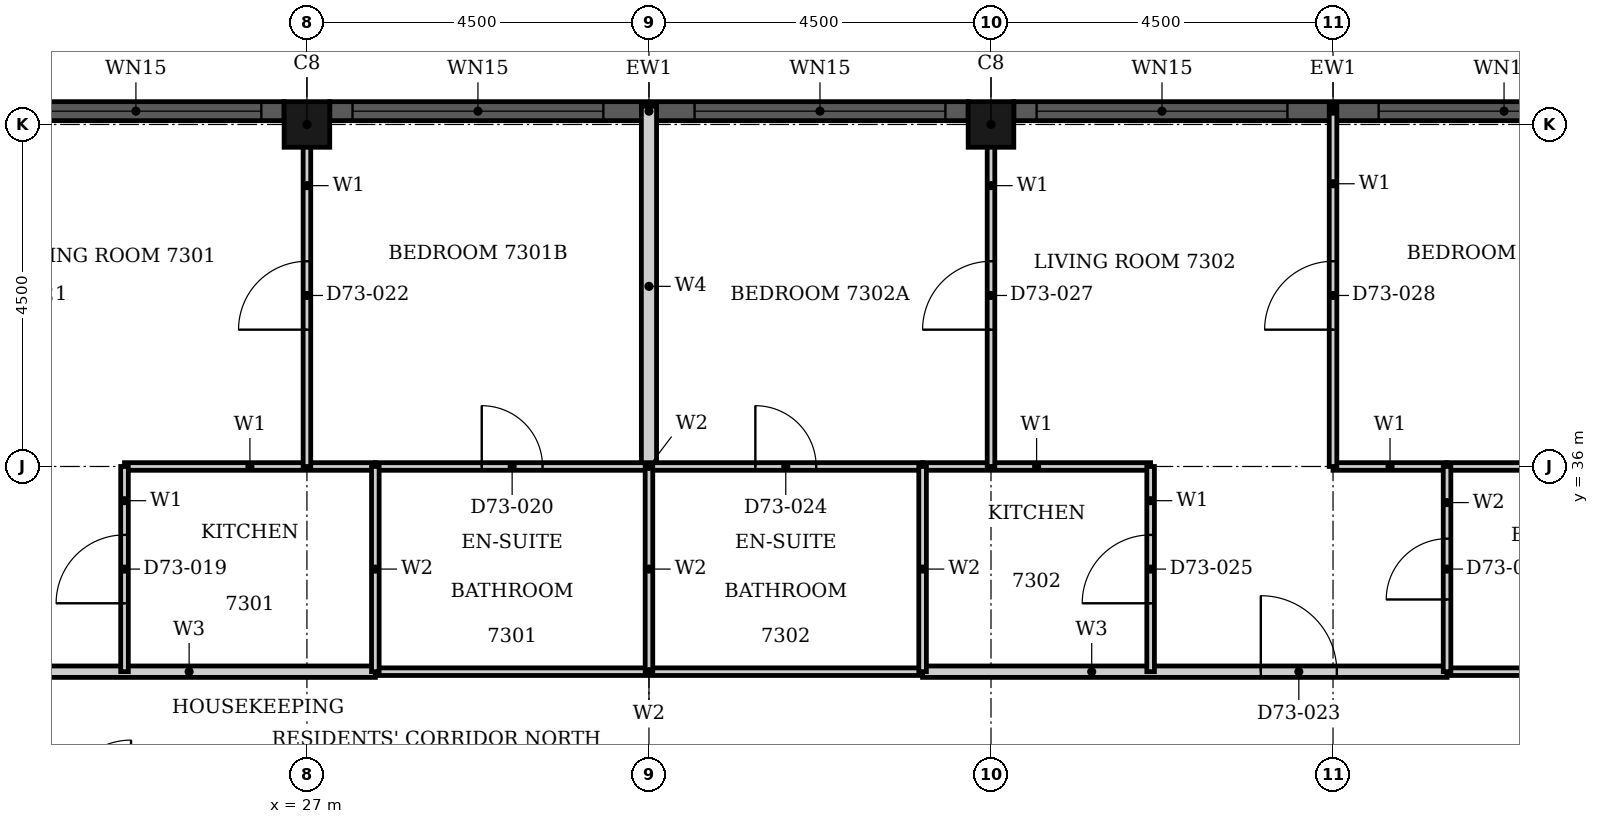
"""IFC4 building model, lengths in metres.
Left out: names, types, materials, properties, quantities, classifications, styles, units other than length and angle.
Written with IfcOpenShell. Run it as: python <this file> out.ifc"""

import sys

from ifc_helpers import new_model, si_unit, direction, frame, frame_2d, origin, origin_2d, place, context, subcontext, project, spatial, rectangle, hollow_rectangle, extrude, element, fill, save


model = new_model("IFC4")
c1 = context("Model", 3, precision=1e-05, world=origin(), true_north=direction((0.0, 1.0)))
c2 = subcontext(c1, "Body", "Model", "MODEL_VIEW")
j1 = project(units=[si_unit("LENGTHUNIT", "METRE"), si_unit("PLANEANGLEUNIT", "RADIAN")], contexts=[c1])
p1 = place(None, origin())
s1 = spatial("IfcSite", under=j1, at=p1, CompositionType="ELEMENT")
p2 = place(p1, origin())
s2 = spatial("IfcBuilding", under=s1, at=p2, CompositionType="ELEMENT")
p3 = place(p2, frame((0.0, 0.0, 287.1)))
s3 = spatial("IfcBuildingStorey", under=s2, at=p3, CompositionType="ELEMENT", Elevation=287.1)
for number, where, z_axis, x_axis in (
    (1, (36.0, 40.5, 0.0), (0.0, 0.0, 1.0), (1.0, 0.0, 0.0)),
    (2, (27.0, 40.5, 0.0), (0.0, 0.0, 1.0), (1.0, 0.0, 0.0)),
):
    element("IfcColumn", number, at=place(p3, frame(where, z_axis=z_axis, x_axis=x_axis)), inside=s3, PredefinedType="COLUMN", context=c2, shape_type="SweptSolid", body=[
        extrude(hollow_rectangle(XDim=0.6, YDim=0.6, WallThickness=0.02, at=origin_2d()), origin(), (0.0, 0.0, 1.0), 3.7),
    ])
p4 = place(p3, frame((44.7, 40.675, 0.0), z_axis=(0.0, 0.0, 1.0), x_axis=(-1.0, 0.0, 0.0)))
e3 = element("IfcWall", 3, at=p4, inside=s3, PredefinedType="SOLIDWALL", context=c2, shape_type="SweptSolid", body=[
    extrude(rectangle(XDim=8.4, YDim=0.25, at=frame_2d((4.2, 0.0))), origin(), (0.0, 0.0, 1.0), 3.7),
])
p5 = place(p4, frame((0.3, 0.0, 0.45)))
e4 = element("IfcOpeningElement", 4, at=p5, cuts=e3, PredefinedType="OPENING", context=c2, shape_type="SweptSolid", body=[
    extrude(rectangle(XDim=3.3, YDim=2.3, at=frame_2d((1.65, 1.15))), frame((0.0, 0.135, 0.0), z_axis=(0.0, -1.0, 0.0), x_axis=(1.0, 0.0, 0.0)), (0.0, 0.0, 1.0), 0.27),
])
p6 = place(p4, frame((4.8, 0.0, 0.45)))
e5 = element("IfcOpeningElement", 5, at=p6, cuts=e3, PredefinedType="OPENING", context=c2, shape_type="SweptSolid", body=[
    extrude(rectangle(XDim=3.3, YDim=2.3, at=frame_2d((1.65, 1.15))), frame((0.0, 0.135, 0.0), z_axis=(0.0, -1.0, 0.0), x_axis=(1.0, 0.0, 0.0)), (0.0, 0.0, 1.0), 0.27),
])
p7 = place(p3, frame((35.7, 40.675, 0.0), z_axis=(0.0, 0.0, 1.0), x_axis=(-1.0, 0.0, 0.0)))
e6 = element("IfcWall", 6, at=p7, inside=s3, PredefinedType="SOLIDWALL", context=c2, shape_type="SweptSolid", body=[
    extrude(rectangle(XDim=8.4, YDim=0.25, at=frame_2d((4.2, 0.0))), origin(), (0.0, 0.0, 1.0), 3.7),
])
p8 = place(p7, frame((0.3, 0.0, 0.45)))
e7 = element("IfcOpeningElement", 7, at=p8, cuts=e6, PredefinedType="OPENING", context=c2, shape_type="SweptSolid", body=[
    extrude(rectangle(XDim=3.3, YDim=2.3, at=frame_2d((1.65, 1.15))), frame((0.0, 0.135, 0.0), z_axis=(0.0, -1.0, 0.0), x_axis=(1.0, 0.0, 0.0)), (0.0, 0.0, 1.0), 0.27),
])
p9 = place(p7, frame((4.8, 0.0, 0.45)))
e8 = element("IfcOpeningElement", 8, at=p9, cuts=e6, PredefinedType="OPENING", context=c2, shape_type="SweptSolid", body=[
    extrude(rectangle(XDim=3.3, YDim=2.3, at=frame_2d((1.65, 1.15))), frame((0.0, 0.135, 0.0), z_axis=(0.0, -1.0, 0.0), x_axis=(1.0, 0.0, 0.0)), (0.0, 0.0, 1.0), 0.27),
])
p10 = place(p3, frame((26.7, 40.675, 0.0), z_axis=(0.0, 0.0, 1.0), x_axis=(-1.0, 0.0, 0.0)))
e9 = element("IfcWall", 9, at=p10, inside=s3, PredefinedType="SOLIDWALL", context=c2, shape_type="SweptSolid", body=[
    extrude(rectangle(XDim=8.4, YDim=0.25, at=frame_2d((4.2, 0.0))), origin(), (0.0, 0.0, 1.0), 3.7),
])
p11 = place(p10, frame((0.3, 0.0, 0.45)))
e10 = element("IfcOpeningElement", 10, at=p11, cuts=e9, PredefinedType="OPENING", context=c2, shape_type="SweptSolid", body=[
    extrude(rectangle(XDim=3.3, YDim=2.3, at=frame_2d((1.65, 1.15))), frame((0.0, 0.135, 0.0), z_axis=(0.0, -1.0, 0.0), x_axis=(1.0, 0.0, 0.0)), (0.0, 0.0, 1.0), 0.27),
])
p12 = place(p10, frame((4.8, 0.0, 0.45)))
e11 = element("IfcOpeningElement", 11, at=p12, cuts=e9, PredefinedType="OPENING", context=c2, shape_type="SweptSolid", body=[
    extrude(rectangle(XDim=3.3, YDim=2.3, at=frame_2d((1.65, 1.15))), frame((0.0, 0.135, 0.0), z_axis=(0.0, -1.0, 0.0), x_axis=(1.0, 0.0, 0.0)), (0.0, 0.0, 1.0), 0.27),
])
p13 = place(p3, frame((20.4, 33.3, 0.0), z_axis=(0.0, 0.0, 1.0), x_axis=(1.0, 0.0, 0.0)))
e12 = element("IfcWall", 12, at=p13, inside=s3, PredefinedType="PARTITIONING", context=c2, shape_type="SweptSolid", body=[
    extrude(rectangle(XDim=7.5, YDim=0.15, at=frame_2d((3.75, 0.0))), origin(), (0.0, 0.0, 1.0), 3.4),
])
p14 = place(p13, frame((1.6, 0.0, 0.0)))
e13 = element("IfcOpeningElement", 13, at=p14, cuts=e12, PredefinedType="OPENING", context=c2, shape_type="SweptSolid", body=[
    extrude(rectangle(XDim=1.0, YDim=2.2, at=frame_2d((0.5, 1.1))), frame((0.0, 0.085, 0.0), z_axis=(0.0, -1.0, 0.0), x_axis=(1.0, 0.0, 0.0)), (0.0, 0.0, 1.0), 0.17),
])
p15 = place(p3, frame((35.1, 33.3, 0.0), z_axis=(0.0, 0.0, 1.0), x_axis=(1.0, 0.0, 0.0)))
e14 = element("IfcWall", 14, at=p15, inside=s3, PredefinedType="PARTITIONING", context=c2, shape_type="SweptSolid", body=[
    extrude(rectangle(XDim=6.9, YDim=0.15, at=frame_2d((3.45, 0.0))), origin(), (0.0, 0.0, 1.0), 3.4),
])
p16 = place(p15, frame((4.45, 0.0, 0.0)))
e15 = element("IfcOpeningElement", 15, at=p16, cuts=e14, PredefinedType="OPENING", context=c2, shape_type="SweptSolid", body=[
    extrude(rectangle(XDim=1.0, YDim=2.2, at=frame_2d((0.5, 1.1))), frame((0.0, 0.085, 0.0), z_axis=(0.0, -1.0, 0.0), x_axis=(1.0, 0.0, 0.0)), (0.0, 0.0, 1.0), 0.17),
])
p17 = place(p3, frame((24.6, 36.0, 0.0), z_axis=(0.0, 0.0, 1.0), x_axis=(1.0, 0.0, 0.0)))
e16 = element("IfcWall", 16, at=p17, inside=s3, PredefinedType="PARTITIONING", context=c2, shape_type="SweptSolid", body=[
    extrude(rectangle(XDim=3.3, YDim=0.1, at=frame_2d((1.65, 0.0))), origin(), (0.0, 0.0, 1.0), 3.4),
])
p18 = place(p3, frame((40.5, 36.0, 0.0), z_axis=(0.0, 0.0, 1.0), x_axis=(1.0, 0.0, 0.0)))
e17 = element("IfcWall", 17, at=p18, inside=s3, PredefinedType="PARTITIONING", context=c2, shape_type="SweptSolid", body=[
    extrude(rectangle(XDim=1.5, YDim=0.1, at=frame_2d((0.75, 0.0))), origin(), (0.0, 0.0, 1.0), 3.4),
])
p19 = place(p3, frame((35.1, 36.0, 0.0), z_axis=(0.0, 0.0, 1.0), x_axis=(1.0, 0.0, 0.0)))
e18 = element("IfcWall", 18, at=p19, inside=s3, PredefinedType="PARTITIONING", context=c2, shape_type="SweptSolid", body=[
    extrude(rectangle(XDim=3.0, YDim=0.1, at=frame_2d((1.5, 0.0))), origin(), (0.0, 0.0, 1.0), 3.4),
])
p20 = place(p3, frame((24.6, 33.3, 0.0), z_axis=(0.0, 0.0, 1.0), x_axis=(0.0, 1.0, 0.0)))
e19 = element("IfcWall", 19, at=p20, inside=s3, PredefinedType="PARTITIONING", context=c2, shape_type="SweptSolid", body=[
    extrude(rectangle(XDim=2.7, YDim=0.1, at=frame_2d((1.35, 0.0))), origin(), (0.0, 0.0, 1.0), 3.4),
])
p21 = place(p20, frame((0.9, 0.0, 0.0)))
e20 = element("IfcOpeningElement", 20, at=p21, cuts=e19, PredefinedType="OPENING", context=c2, shape_type="SweptSolid", body=[
    extrude(rectangle(XDim=0.9, YDim=2.1, at=frame_2d((0.45, 1.05))), frame((0.0, 0.06, 0.0), z_axis=(0.0, -1.0, 0.0), x_axis=(1.0, 0.0, 0.0)), (0.0, 0.0, 1.0), 0.12),
])
p22 = place(p3, frame((27.0, 36.0, 0.0), z_axis=(0.0, 0.0, 1.0), x_axis=(0.0, 1.0, 0.0)))
e21 = element("IfcWall", 21, at=p22, inside=s3, PredefinedType="PARTITIONING", context=c2, shape_type="SweptSolid", body=[
    extrude(rectangle(XDim=4.69, YDim=0.1, at=frame_2d((2.345, 0.0))), origin(), (0.0, 0.0, 1.0), 3.4),
])
p23 = place(p22, frame((1.8, 0.0, 0.0)))
e22 = element("IfcOpeningElement", 22, at=p23, cuts=e21, PredefinedType="OPENING", context=c2, shape_type="SweptSolid", body=[
    extrude(rectangle(XDim=0.9, YDim=2.1, at=frame_2d((0.45, 1.05))), frame((0.0, 0.06, 0.0), z_axis=(0.0, -1.0, 0.0), x_axis=(1.0, 0.0, 0.0)), (0.0, 0.0, 1.0), 0.12),
])
p24 = place(p3, frame((36.0, 36.0, 0.0), z_axis=(0.0, 0.0, 1.0), x_axis=(0.0, 1.0, 0.0)))
e23 = element("IfcWall", 23, at=p24, inside=s3, PredefinedType="PARTITIONING", context=c2, shape_type="SweptSolid", body=[
    extrude(rectangle(XDim=4.69, YDim=0.1, at=frame_2d((2.345, 0.0))), origin(), (0.0, 0.0, 1.0), 3.4),
])
p25 = place(p24, frame((1.8, 0.0, 0.0)))
e24 = element("IfcOpeningElement", 24, at=p25, cuts=e23, PredefinedType="OPENING", context=c2, shape_type="SweptSolid", body=[
    extrude(rectangle(XDim=0.9, YDim=2.1, at=frame_2d((0.45, 1.05))), frame((0.0, 0.06, 0.0), z_axis=(0.0, -1.0, 0.0), x_axis=(1.0, 0.0, 0.0)), (0.0, 0.0, 1.0), 0.12),
])
p26 = place(p3, frame((38.1, 33.3, 0.0), z_axis=(0.0, 0.0, 1.0), x_axis=(0.0, 1.0, 0.0)))
e25 = element("IfcWall", 25, at=p26, inside=s3, PredefinedType="PARTITIONING", context=c2, shape_type="SweptSolid", body=[
    extrude(rectangle(XDim=2.7, YDim=0.1, at=frame_2d((1.35, 0.0))), origin(), (0.0, 0.0, 1.0), 3.4),
])
p27 = place(p26, frame((0.9, 0.0, 0.0)))
e26 = element("IfcOpeningElement", 26, at=p27, cuts=e25, PredefinedType="OPENING", context=c2, shape_type="SweptSolid", body=[
    extrude(rectangle(XDim=0.9, YDim=2.1, at=frame_2d((0.45, 1.05))), frame((0.0, 0.06, 0.0), z_axis=(0.0, -1.0, 0.0), x_axis=(1.0, 0.0, 0.0)), (0.0, 0.0, 1.0), 0.12),
])
p28 = place(p3, frame((40.5, 36.0, 0.0), z_axis=(0.0, 0.0, 1.0), x_axis=(0.0, 1.0, 0.0)))
e27 = element("IfcWall", 27, at=p28, inside=s3, PredefinedType="PARTITIONING", context=c2, shape_type="SweptSolid", body=[
    extrude(rectangle(XDim=4.74, YDim=0.1, at=frame_2d((2.37, 0.0))), origin(), (0.0, 0.0, 1.0), 3.4),
])
p29 = place(p28, frame((1.8, 0.0, 0.0)))
e28 = element("IfcOpeningElement", 28, at=p29, cuts=e27, PredefinedType="OPENING", context=c2, shape_type="SweptSolid", body=[
    extrude(rectangle(XDim=0.9, YDim=2.1, at=frame_2d((0.45, 1.05))), frame((0.0, 0.06, 0.0), z_axis=(0.0, -1.0, 0.0), x_axis=(1.0, 0.0, 0.0)), (0.0, 0.0, 1.0), 0.12),
])
p30 = place(p3, frame((31.5, 36.0, 0.0), z_axis=(0.0, 0.0, 1.0), x_axis=(0.0, 1.0, 0.0)))
e29 = element("IfcWall", 29, at=p30, inside=s3, PredefinedType="PARTITIONING", context=c2, shape_type="SweptSolid", body=[
    extrude(rectangle(XDim=4.74, YDim=0.2, at=frame_2d((2.37, 0.0))), origin(), (0.0, 0.0, 1.0), 3.4),
])
p31 = place(p3, frame((27.9, 33.3, 0.0), z_axis=(0.0, 0.0, 1.0), x_axis=(1.0, 0.0, 0.0)))
e30 = element("IfcWall", 30, at=p31, inside=s3, PredefinedType="PARTITIONING", context=c2, shape_type="SweptSolid", body=[
    extrude(rectangle(XDim=7.2, YDim=0.1, at=frame_2d((3.6, 0.0))), origin(), (0.0, 0.0, 1.0), 3.4),
])
p32 = place(p3, frame((42.0, 33.3, 0.0), z_axis=(0.0, 0.0, 1.0), x_axis=(1.0, 0.0, 0.0)))
e31 = element("IfcWall", 31, at=p32, inside=s3, PredefinedType="PARTITIONING", context=c2, shape_type="SweptSolid", body=[
    extrude(rectangle(XDim=3.0, YDim=0.1, at=frame_2d((1.5, 0.0))), origin(), (0.0, 0.0, 1.0), 3.4),
])
p33 = place(p3, frame((27.9, 36.0, 0.0), z_axis=(0.0, 0.0, 1.0), x_axis=(1.0, 0.0, 0.0)))
e32 = element("IfcWall", 32, at=p33, inside=s3, PredefinedType="PARTITIONING", context=c2, shape_type="SweptSolid", body=[
    extrude(rectangle(XDim=7.2, YDim=0.1, at=frame_2d((3.6, 0.0))), origin(), (0.0, 0.0, 1.0), 3.4),
])
p34 = place(p33, frame((1.4, 0.0, 0.0)))
e33 = element("IfcOpeningElement", 33, at=p34, cuts=e32, PredefinedType="OPENING", context=c2, shape_type="SweptSolid", body=[
    extrude(rectangle(XDim=0.8, YDim=2.1, at=frame_2d((0.4, 1.05))), frame((0.0, 0.06, 0.0), z_axis=(0.0, -1.0, 0.0), x_axis=(1.0, 0.0, 0.0)), (0.0, 0.0, 1.0), 0.12),
])
p35 = place(p33, frame((5.0, 0.0, 0.0)))
e34 = element("IfcOpeningElement", 34, at=p35, cuts=e32, PredefinedType="OPENING", context=c2, shape_type="SweptSolid", body=[
    extrude(rectangle(XDim=0.8, YDim=2.1, at=frame_2d((0.4, 1.05))), frame((0.0, 0.06, 0.0), z_axis=(0.0, -1.0, 0.0), x_axis=(1.0, 0.0, 0.0)), (0.0, 0.0, 1.0), 0.12),
])
p36 = place(p3, frame((42.0, 36.0, 0.0), z_axis=(0.0, 0.0, 1.0), x_axis=(1.0, 0.0, 0.0)))
e35 = element("IfcWall", 35, at=p36, inside=s3, PredefinedType="PARTITIONING", context=c2, shape_type="SweptSolid", body=[
    extrude(rectangle(XDim=3.0, YDim=0.1, at=frame_2d((1.5, 0.0))), origin(), (0.0, 0.0, 1.0), 3.4),
])
for number, where, z_axis, x_axis in (
    (36, (27.9, 33.3, 0.0), (0.0, 0.0, 1.0), (0.0, 1.0, 0.0)),
    (37, (31.5, 33.3, 0.0), (0.0, 0.0, 1.0), (0.0, 1.0, 0.0)),
    (38, (35.1, 33.3, 0.0), (0.0, 0.0, 1.0), (0.0, 1.0, 0.0)),
):
    element("IfcWall", number, at=place(p3, frame(where, z_axis=z_axis, x_axis=x_axis)), inside=s3, PredefinedType="PARTITIONING", context=c2, shape_type="SweptSolid", body=[
        extrude(rectangle(XDim=2.7, YDim=0.1, at=frame_2d((1.35, 0.0))), origin(), (0.0, 0.0, 1.0), 3.4),
    ])
p37 = place(p3, frame((42.0, 33.3, 0.0), z_axis=(0.0, 0.0, 1.0), x_axis=(0.0, 1.0, 0.0)))
e39 = element("IfcWall", 39, at=p37, inside=s3, PredefinedType="PARTITIONING", context=c2, shape_type="SweptSolid", body=[
    extrude(rectangle(XDim=2.7, YDim=0.1, at=frame_2d((1.35, 0.0))), origin(), (0.0, 0.0, 1.0), 3.4),
])
p38 = place(p37, frame((0.95, 0.0, 0.0)))
e40 = element("IfcOpeningElement", 40, at=p38, cuts=e39, PredefinedType="OPENING", context=c2, shape_type="SweptSolid", body=[
    extrude(rectangle(XDim=0.8, YDim=2.1, at=frame_2d((0.4, 1.05))), frame((0.0, 0.06, 0.0), z_axis=(0.0, -1.0, 0.0), x_axis=(1.0, 0.0, 0.0)), (0.0, 0.0, 1.0), 0.12),
])
p39 = place(p5, origin())
e41 = element("IfcWindow", 41, at=p39, inside=s3, PartitioningType="SINGLE_PANEL", PredefinedType="WINDOW", context=c2, shape_type="SweptSolid", body=[
    extrude(rectangle(XDim=3.3, YDim=2.3, at=frame_2d((1.65, 1.15))), frame((0.0, 0.03, 0.0), z_axis=(0.0, -1.0, 0.0), x_axis=(1.0, 0.0, 0.0)), (0.0, 0.0, 1.0), 0.06),
])
fill(e4, e41)
p40 = place(p6, origin())
e42 = element("IfcWindow", 42, at=p40, inside=s3, PartitioningType="SINGLE_PANEL", PredefinedType="WINDOW", context=c2, shape_type="SweptSolid", body=[
    extrude(rectangle(XDim=3.3, YDim=2.3, at=frame_2d((1.65, 1.15))), frame((0.0, 0.03, 0.0), z_axis=(0.0, -1.0, 0.0), x_axis=(1.0, 0.0, 0.0)), (0.0, 0.0, 1.0), 0.06),
])
fill(e5, e42)
p41 = place(p8, origin())
e43 = element("IfcWindow", 43, at=p41, inside=s3, PartitioningType="SINGLE_PANEL", PredefinedType="WINDOW", context=c2, shape_type="SweptSolid", body=[
    extrude(rectangle(XDim=3.3, YDim=2.3, at=frame_2d((1.65, 1.15))), frame((0.0, 0.03, 0.0), z_axis=(0.0, -1.0, 0.0), x_axis=(1.0, 0.0, 0.0)), (0.0, 0.0, 1.0), 0.06),
])
fill(e7, e43)
p42 = place(p9, origin())
e44 = element("IfcWindow", 44, at=p42, inside=s3, PartitioningType="SINGLE_PANEL", PredefinedType="WINDOW", context=c2, shape_type="SweptSolid", body=[
    extrude(rectangle(XDim=3.3, YDim=2.3, at=frame_2d((1.65, 1.15))), frame((0.0, 0.03, 0.0), z_axis=(0.0, -1.0, 0.0), x_axis=(1.0, 0.0, 0.0)), (0.0, 0.0, 1.0), 0.06),
])
fill(e8, e44)
p43 = place(p11, origin())
e45 = element("IfcWindow", 45, at=p43, inside=s3, PartitioningType="SINGLE_PANEL", PredefinedType="WINDOW", context=c2, shape_type="SweptSolid", body=[
    extrude(rectangle(XDim=3.3, YDim=2.3, at=frame_2d((1.65, 1.15))), frame((0.0, 0.03, 0.0), z_axis=(0.0, -1.0, 0.0), x_axis=(1.0, 0.0, 0.0)), (0.0, 0.0, 1.0), 0.06),
])
fill(e10, e45)
p44 = place(p21, origin())
e46 = element("IfcDoor", 46, at=p44, inside=s3, OperationType="SINGLE_SWING_LEFT", PredefinedType="DOOR", context=c2, shape_type="SweptSolid", body=[
    extrude(rectangle(XDim=0.9, YDim=2.1, at=frame_2d((0.45, 1.05))), frame((0.0, 0.025, 0.0), z_axis=(0.0, -1.0, 0.0), x_axis=(1.0, 0.0, 0.0)), (0.0, 0.0, 1.0), 0.05),
])
fill(e20, e46)
p45 = place(p34, origin())
e47 = element("IfcDoor", 47, at=p45, inside=s3, OperationType="SINGLE_SWING_RIGHT", PredefinedType="DOOR", context=c2, shape_type="SweptSolid", body=[
    extrude(rectangle(XDim=0.8, YDim=2.1, at=frame_2d((0.4, 1.05))), frame((0.0, 0.025, 0.0), z_axis=(0.0, -1.0, 0.0), x_axis=(1.0, 0.0, 0.0)), (0.0, 0.0, 1.0), 0.05),
])
fill(e33, e47)
p46 = place(p23, origin())
e48 = element("IfcDoor", 48, at=p46, inside=s3, OperationType="SINGLE_SWING_RIGHT", PredefinedType="DOOR", context=c2, shape_type="SweptSolid", body=[
    extrude(rectangle(XDim=0.9, YDim=2.1, at=frame_2d((0.45, 1.05))), frame((0.0, 0.025, 0.0), z_axis=(0.0, -1.0, 0.0), x_axis=(1.0, 0.0, 0.0)), (0.0, 0.0, 1.0), 0.05),
])
fill(e22, e48)
p47 = place(p16, origin())
e49 = element("IfcDoor", 49, at=p47, inside=s3, OperationType="SINGLE_SWING_LEFT", PredefinedType="DOOR", context=c2, shape_type="SweptSolid", body=[
    extrude(rectangle(XDim=1.0, YDim=2.2, at=frame_2d((0.5, 1.1))), frame((0.0, 0.025, 0.0), z_axis=(0.0, -1.0, 0.0), x_axis=(1.0, 0.0, 0.0)), (0.0, 0.0, 1.0), 0.05),
])
fill(e15, e49)
p48 = place(p35, origin())
e50 = element("IfcDoor", 50, at=p48, inside=s3, OperationType="SINGLE_SWING_LEFT", PredefinedType="DOOR", context=c2, shape_type="SweptSolid", body=[
    extrude(rectangle(XDim=0.8, YDim=2.1, at=frame_2d((0.4, 1.05))), frame((0.0, 0.025, 0.0), z_axis=(0.0, -1.0, 0.0), x_axis=(1.0, 0.0, 0.0)), (0.0, 0.0, 1.0), 0.05),
])
fill(e34, e50)
p49 = place(p27, origin())
e51 = element("IfcDoor", 51, at=p49, inside=s3, OperationType="SINGLE_SWING_LEFT", PredefinedType="DOOR", context=c2, shape_type="SweptSolid", body=[
    extrude(rectangle(XDim=0.9, YDim=2.1, at=frame_2d((0.45, 1.05))), frame((0.0, 0.025, 0.0), z_axis=(0.0, -1.0, 0.0), x_axis=(1.0, 0.0, 0.0)), (0.0, 0.0, 1.0), 0.05),
])
fill(e26, e51)
p50 = place(p38, origin())
e52 = element("IfcDoor", 52, at=p50, inside=s3, OperationType="SINGLE_SWING_RIGHT", PredefinedType="DOOR", context=c2, shape_type="SweptSolid", body=[
    extrude(rectangle(XDim=0.8, YDim=2.1, at=frame_2d((0.4, 1.05))), frame((0.0, 0.025, 0.0), z_axis=(0.0, -1.0, 0.0), x_axis=(1.0, 0.0, 0.0)), (0.0, 0.0, 1.0), 0.05),
])
fill(e40, e52)
p51 = place(p25, origin())
e53 = element("IfcDoor", 53, at=p51, inside=s3, OperationType="SINGLE_SWING_LEFT", PredefinedType="DOOR", context=c2, shape_type="SweptSolid", body=[
    extrude(rectangle(XDim=0.9, YDim=2.1, at=frame_2d((0.45, 1.05))), frame((0.0, 0.025, 0.0), z_axis=(0.0, -1.0, 0.0), x_axis=(1.0, 0.0, 0.0)), (0.0, 0.0, 1.0), 0.05),
])
fill(e24, e53)
p52 = place(p29, origin())
e54 = element("IfcDoor", 54, at=p52, inside=s3, OperationType="SINGLE_SWING_LEFT", PredefinedType="DOOR", context=c2, shape_type="SweptSolid", body=[
    extrude(rectangle(XDim=0.9, YDim=2.1, at=frame_2d((0.45, 1.05))), frame((0.0, 0.025, 0.0), z_axis=(0.0, -1.0, 0.0), x_axis=(1.0, 0.0, 0.0)), (0.0, 0.0, 1.0), 0.05),
])
fill(e28, e54)
save(model, sys.argv[1])
